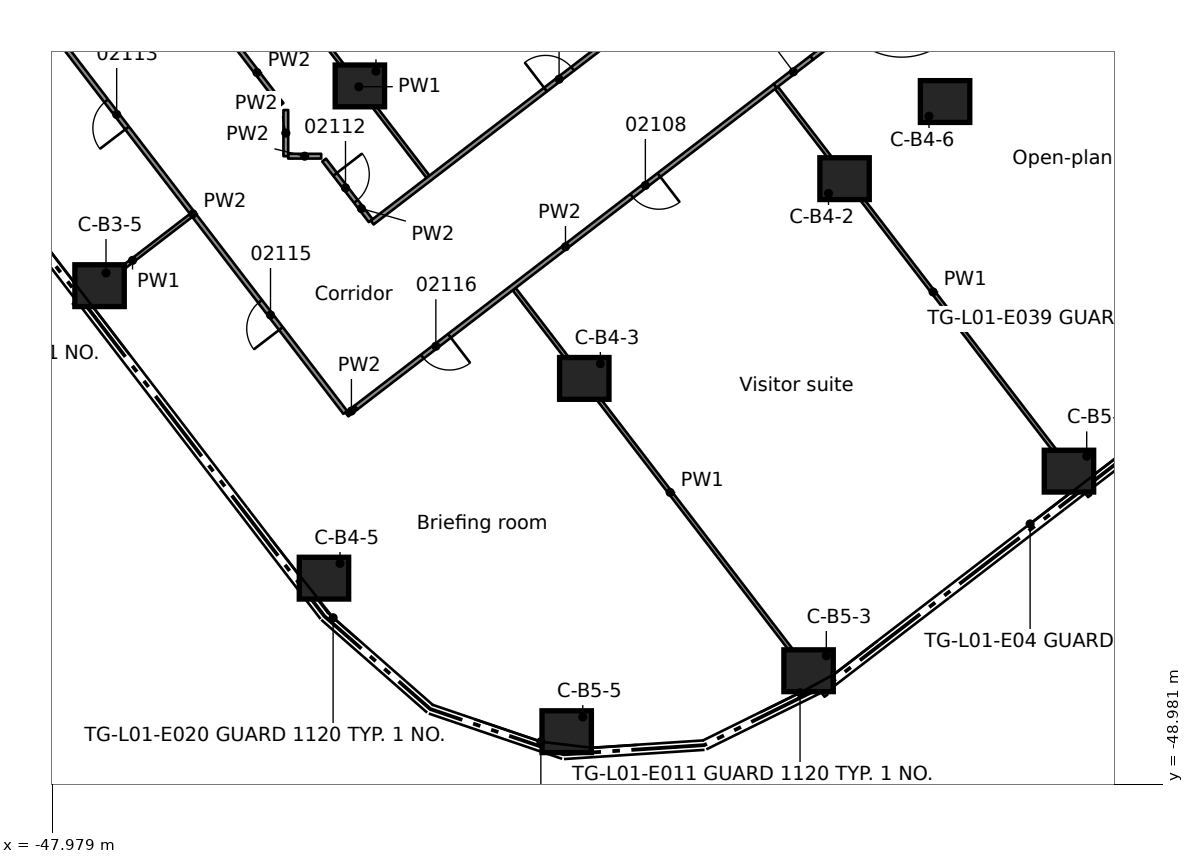
"""IFC4 building model, lengths in metres.
Left out: names, types, materials, properties, quantities, classifications, styles, units other than length and angle.
Written with IfcOpenShell. Run it as: python <this file> out.ifc"""

import sys

from ifc_helpers import new_model, si_unit, direction, frame, frame_2d, origin, origin_2d, place, context, subcontext, project, spatial, rectangle, extrude, element, fill, save


model = new_model("IFC4")
c1 = context("Model", 3, precision=1e-05, world=origin(), true_north=direction((0.0, 1.0)))
c2 = subcontext(c1, "Body", "Model", "MODEL_VIEW")
j1 = project(units=[si_unit("LENGTHUNIT", "METRE"), si_unit("PLANEANGLEUNIT", "RADIAN")], contexts=[c1])
p1 = place(None, origin())
s1 = spatial("IfcSite", under=j1, at=p1, CompositionType="ELEMENT")
p2 = place(p1, origin())
s2 = spatial("IfcBuilding", under=s1, at=p2, CompositionType="ELEMENT")
p3 = place(p2, frame((0.0, 0.0, 10.5)))
s3 = spatial("IfcBuildingStorey", under=s2, at=p3, CompositionType="ELEMENT", Elevation=10.5)
for number, where, z_axis, x_axis in (
    (1, (-39.879, -30.6, -1.0), (0.0, 0.0, 1.0), (0.707, 0.707, 0.0)),
    (2, (-46.729, -35.856, -1.0), (0.0, 0.0, 1.0), (0.707, 0.707, 0.0)),
):
    element("IfcColumn", number, at=place(p3, frame(where, z_axis=z_axis, x_axis=x_axis)), inside=s3, PredefinedType="COLUMN", context=c2, shape_type="SweptSolid", body=[
        extrude(rectangle(XDim=3.4, YDim=3.4, at=origin_2d()), origin(), (0.0, 0.0, 1.0), 1.0),
    ])
p4 = place(p3, frame((-27.125, -33.04, -1.0), z_axis=(0.0, 0.0, 1.0), x_axis=(0.707106781187, 0.707106781187, 0.0)))
e3 = element("IfcColumn", 3, at=p4, inside=s3, PredefinedType="COLUMN", context=c2, shape_type="SweptSolid", body=[
    extrude(rectangle(XDim=3.25, YDim=3.25, at=origin_2d()), origin(), (0.0, 0.0, 1.0), 1.0),
])
for number, where, z_axis, x_axis in (
    (4, (-33.974, -38.296, -1.0), (0.0, 0.0, 1.0), (0.707, 0.707, 0.0)),
    (5, (-40.824, -43.552, -1.0), (0.0, 0.0, 1.0), (0.707, 0.707, 0.0)),
):
    element("IfcColumn", number, at=place(p3, frame(where, z_axis=z_axis, x_axis=x_axis)), inside=s3, PredefinedType="COLUMN", context=c2, shape_type="SweptSolid", body=[
        extrude(rectangle(XDim=3.4, YDim=3.4, at=origin_2d()), origin(), (0.0, 0.0, 1.0), 1.0),
    ])
p5 = place(p3, frame((-24.48, -31.011, -1.0), z_axis=(0.0, 0.0, 1.0), x_axis=(0.707106781187, 0.707106781187, 0.0)))
e6 = element("IfcColumn", 6, at=p5, inside=s3, PredefinedType="COLUMN", context=c2, shape_type="SweptSolid", body=[
    extrude(rectangle(XDim=3.25, YDim=3.25, at=origin_2d()), origin(), (0.0, 0.0, 1.0), 1.0),
])
for number, where, z_axis, x_axis in (
    (7, (-20.99, -28.333, -1.0), (0.0, 0.0, 1.0), (0.707, 0.707, 0.0)),
    (8, (-21.22, -40.736, -1.0), (0.0, 0.0, 1.0), (0.707, 0.707, 0.0)),
    (9, (-28.072, -45.988, -1.0), (0.0, 0.0, 1.0), (0.707, 0.707, 0.0)),
    (10, (-34.437, -47.592, -1.0), (0.0, 0.0, 1.0), (0.707, 0.707, 0.0)),
):
    element("IfcColumn", number, at=place(p3, frame(where, z_axis=z_axis, x_axis=x_axis)), inside=s3, PredefinedType="COLUMN", context=c2, shape_type="SweptSolid", body=[
        extrude(rectangle(XDim=3.4, YDim=3.4, at=origin_2d()), origin(), (0.0, 0.0, 1.0), 1.0),
    ])
p6 = place(p3, frame((-18.57, -35.417, -1.0), z_axis=(0.0, 0.0, 1.0), x_axis=(0.707106781187, 0.707106781187, 0.0)))
e11 = element("IfcColumn", 11, at=p6, inside=s3, PredefinedType="COLUMN", context=c2, shape_type="SweptSolid", body=[
    extrude(rectangle(XDim=2.95, YDim=2.95, at=origin_2d()), origin(), (0.0, 0.0, 1.0), 1.0),
])
for number, where, z_axis, x_axis in (
    (12, (-39.879, -30.6, 0.0), (0.0, 0.0, 1.0), (1.0, 0.0, 0.0)),
    (13, (-46.729, -35.856, 0.0), (0.0, 0.0, 1.0), (1.0, 0.0, 0.0)),
    (14, (-27.125, -33.04, 0.0), (0.0, 0.0, 1.0), (1.0, 0.0, 0.0)),
    (15, (-33.974, -38.296, 0.0), (0.0, 0.0, 1.0), (1.0, 0.0, 0.0)),
    (16, (-40.824, -43.552, 0.0), (0.0, 0.0, 1.0), (1.0, 0.0, 0.0)),
    (17, (-24.48, -31.011, 0.0), (0.0, 0.0, 1.0), (1.0, 0.0, 0.0)),
    (18, (-21.22, -40.736, 0.0), (0.0, 0.0, 1.0), (1.0, 0.0, 0.0)),
    (19, (-28.072, -45.988, 0.0), (0.0, 0.0, 1.0), (1.0, 0.0, 0.0)),
    (20, (-34.437, -47.592, 0.0), (0.0, 0.0, 1.0), (1.0, 0.0, 0.0)),
):
    element("IfcColumn", number, at=place(p3, frame(where, z_axis=z_axis, x_axis=x_axis)), inside=s3, PredefinedType="COLUMN", context=c2, shape_type="SweptSolid", body=[
        extrude(rectangle(XDim=1.3, YDim=1.1, at=origin_2d()), origin(), (0.0, 0.0, 1.0), 5.0),
    ])
p7 = place(p3, frame((-40.264, -39.191, 0.0), z_axis=(0.0, 0.0, 1.0), x_axis=(-0.608717571556, 0.793386991373, 0.0)))
e21 = element("IfcWall", 21, at=p7, inside=s3, PredefinedType="PARTITIONING", context=c2, shape_type="SweptSolid", body=[
    extrude(rectangle(XDim=13.169, YDim=0.125, at=frame_2d((6.584, 0.0))), origin(), (0.0, 0.0, 1.0), 4.58),
])
p8 = place(p7, frame((9.431, 0.0, 0.0)))
e22 = element("IfcOpeningElement", 22, at=p8, cuts=e21, PredefinedType="OPENING", context=c2, shape_type="SweptSolid", body=[
    extrude(rectangle(XDim=0.9, YDim=2.1, at=frame_2d((0.45, 1.05))), frame((0.0, 0.073, 0.0), z_axis=(0.0, -1.0, 0.0), x_axis=(1.0, 0.0, 0.0)), (0.0, 0.0, 1.0), 0.145),
])
p9 = place(p7, frame((2.781, 0.0, 0.0)))
e23 = element("IfcOpeningElement", 23, at=p9, cuts=e21, PredefinedType="OPENING", context=c2, shape_type="SweptSolid", body=[
    extrude(rectangle(XDim=0.9, YDim=2.1, at=frame_2d((0.45, 1.05))), frame((0.0, 0.073, 0.0), z_axis=(0.0, -1.0, 0.0), x_axis=(1.0, 0.0, 0.0)), (0.0, 0.0, 1.0), 0.145),
])
p10 = place(p3, frame((-43.231, -29.408, 0.0), z_axis=(0.0, 0.0, 1.0), x_axis=(0.608774942854, -0.79334297057, 0.0)))
e24 = element("IfcWall", 24, at=p10, inside=s3, PredefinedType="PARTITIONING", context=c2, shape_type="SweptSolid", body=[
    extrude(rectangle(XDim=2.119, YDim=0.125, at=frame_2d((1.06, 0.0))), origin(), (0.0, 0.0, 1.0), 4.58),
])
p11 = place(p3, frame((-40.82, -32.551, 0.0), z_axis=(0.0, 0.0, 1.0), x_axis=(0.609452676656, -0.792822448545, 0.0)))
e25 = element("IfcWall", 25, at=p11, inside=s3, PredefinedType="PARTITIONING", context=c2, shape_type="SweptSolid", body=[
    extrude(rectangle(XDim=2.012, YDim=0.125, at=frame_2d((1.006, 0.0))), origin(), (0.0, 0.0, 1.0), 4.58),
])
p12 = place(p11, frame((0.473, 0.0, 0.0)))
e26 = element("IfcOpeningElement", 26, at=p12, cuts=e25, PredefinedType="OPENING", context=c2, shape_type="SweptSolid", body=[
    extrude(rectangle(XDim=0.9, YDim=2.1, at=frame_2d((0.45, 1.05))), frame((0.0, 0.073, 0.0), z_axis=(0.0, -1.0, 0.0), x_axis=(1.0, 0.0, 0.0)), (0.0, 0.0, 1.0), 0.145),
])
p13 = place(p3, frame((-41.724, -28.252, 0.0), z_axis=(0.0, 0.0, 1.0), x_axis=(0.608928252062, -0.793225304589, 0.0)))
e27 = element("IfcWall", 27, at=p13, inside=s3, PredefinedType="PARTITIONING", context=c2, shape_type="SweptSolid", body=[
    extrude(rectangle(XDim=5.973, YDim=0.1, at=frame_2d((2.987, 0.0))), origin(), (0.0, 0.0, 1.0), 4.58),
])
p14 = place(p3, frame((-35.819, -35.947, 0.0), z_axis=(0.0, 0.0, 1.0), x_axis=(0.608745897366, -0.793365257898, 0.0)))
e28 = element("IfcWall", 28, at=p14, inside=s3, PredefinedType="PARTITIONING", context=c2, shape_type="SweptSolid", body=[
    extrude(rectangle(XDim=13.482, YDim=0.1, at=frame_2d((6.741, 0.0))), origin(), (0.0, 0.0, 1.0), 4.58),
])
p15 = place(p3, frame((-28.917, -30.652, 0.0), z_axis=(0.0, 0.0, 1.0), x_axis=(0.608788953199, -0.793332219478, 0.0)))
e29 = element("IfcWall", 29, at=p15, inside=s3, PredefinedType="PARTITIONING", context=c2, shape_type="SweptSolid", body=[
    extrude(rectangle(XDim=13.535, YDim=0.1, at=frame_2d((6.768, 0.0))), origin(), (0.0, 0.0, 1.0), 4.58),
])
p16 = place(p3, frame((-20.431, -23.791, 0.0), z_axis=(0.0, 0.0, 1.0), x_axis=(0.608708319694, -0.793394089678, 0.0)))
e30 = element("IfcWall", 30, at=p16, inside=s3, PredefinedType="PARTITIONING", context=c2, shape_type="SweptSolid", body=[
    extrude(rectangle(XDim=13.813, YDim=0.1, at=frame_2d((6.906, 0.0))), origin(), (0.0, 0.0, 1.0), 4.58),
])
p17 = place(p3, frame((-41.766, -32.449, 0.0), z_axis=(0.0, 0.0, 1.0), x_axis=(1.0, 0.0, 0.0)))
e31 = element("IfcWall", 31, at=p17, inside=s3, PredefinedType="PARTITIONING", context=c2, shape_type="SweptSolid", body=[
    extrude(rectangle(XDim=0.869, YDim=0.125, at=frame_2d((0.435, 0.0))), origin(), (0.0, 0.0, 1.0), 4.58),
])
p18 = place(p3, frame((-40.221, -39.245, 0.0), z_axis=(0.0, 0.0, 1.0), x_axis=(0.79539441782, 0.606092171291, 0.0)))
e32 = element("IfcWall", 32, at=p18, inside=s3, PredefinedType="PARTITIONING", context=c2, shape_type="SweptSolid", body=[
    extrude(rectangle(XDim=0.301, YDim=0.125, at=frame_2d((0.15, 0.0))), origin(), (0.0, 0.0, 1.0), 4.58),
])
p19 = place(p3, frame((-28.955, -30.6, 0.0), z_axis=(0.0, 0.0, 1.0), x_axis=(0.793590253862, 0.608452552772, 0.0)))
e33 = element("IfcWall", 33, at=p19, inside=s3, PredefinedType="PARTITIONING", context=c2, shape_type="SweptSolid", body=[
    extrude(rectangle(XDim=1.22, YDim=0.125, at=frame_2d((0.61, 0.0))), origin(), (0.0, 0.0, 1.0), 4.58),
])
p20 = place(p3, frame((-28.955, -30.6, 0.0), z_axis=(0.0, 0.0, 1.0), x_axis=(-0.793294727074, -0.608837807627, 0.0)))
e34 = element("IfcWall", 34, at=p20, inside=s3, PredefinedType="PARTITIONING", context=c2, shape_type="SweptSolid", body=[
    extrude(rectangle(XDim=13.9, YDim=0.125, at=frame_2d((6.95, 0.0))), origin(), (0.0, 0.0, 1.0), 4.58),
])
p21 = place(p20, frame((3.851, 0.0, 0.0)))
e35 = element("IfcOpeningElement", 35, at=p21, cuts=e34, PredefinedType="OPENING", context=c2, shape_type="SweptSolid", body=[
    extrude(rectangle(XDim=0.9, YDim=2.1, at=frame_2d((0.45, 1.05))), frame((0.0, 0.073, 0.0), z_axis=(0.0, -1.0, 0.0), x_axis=(1.0, 0.0, 0.0)), (0.0, 0.0, 1.0), 0.145),
])
p22 = place(p20, frame((10.801, 0.0, 0.0)))
e36 = element("IfcOpeningElement", 36, at=p22, cuts=e34, PredefinedType="OPENING", context=c2, shape_type="SweptSolid", body=[
    extrude(rectangle(XDim=0.9, YDim=2.1, at=frame_2d((0.45, 1.05))), frame((0.0, 0.073, 0.0), z_axis=(0.0, -1.0, 0.0), x_axis=(1.0, 0.0, 0.0)), (0.0, 0.0, 1.0), 0.145),
])
p23 = place(p3, frame((-20.567, -24.164, 0.0), z_axis=(0.0, 0.0, 1.0), x_axis=(-0.793345387212, -0.608771793523, 0.0)))
e37 = element("IfcWall", 37, at=p23, inside=s3, PredefinedType="PARTITIONING", context=c2, shape_type="SweptSolid", body=[
    extrude(rectangle(XDim=9.353, YDim=0.125, at=frame_2d((4.677, 0.0))), origin(), (0.0, 0.0, 1.0), 4.58),
])
p24 = place(p23, frame((6.373, 0.0, 0.0)))
e38 = element("IfcOpeningElement", 38, at=p24, cuts=e37, PredefinedType="OPENING", context=c2, shape_type="SweptSolid", body=[
    extrude(rectangle(XDim=1.8, YDim=2.1, at=frame_2d((0.9, 1.05))), frame((0.0, 0.073, 0.0), z_axis=(0.0, -1.0, 0.0), x_axis=(1.0, 0.0, 0.0)), (0.0, 0.0, 1.0), 0.145),
])
p25 = place(p3, frame((-39.556, -34.196, 0.0), z_axis=(0.0, 0.0, 1.0), x_axis=(0.793448872505, 0.608636908773, 0.0)))
e39 = element("IfcWall", 39, at=p25, inside=s3, PredefinedType="PARTITIONING", context=c2, shape_type="SweptSolid", body=[
    extrude(rectangle(XDim=20.788, YDim=0.125, at=frame_2d((10.394, 0.0))), origin(), (0.0, 0.0, 1.0), 4.58),
])
p26 = place(p25, frame((18.0, 0.0, 0.0)))
e40 = element("IfcOpeningElement", 40, at=p26, cuts=e39, PredefinedType="OPENING", context=c2, shape_type="SweptSolid", body=[
    extrude(rectangle(XDim=0.9, YDim=2.1, at=frame_2d((0.45, 1.05))), frame((0.0, 0.073, 0.0), z_axis=(0.0, -1.0, 0.0), x_axis=(1.0, 0.0, 0.0)), (0.0, 0.0, 1.0), 0.145),
])
p27 = place(p25, frame((13.419, 0.0, 0.0)))
e41 = element("IfcOpeningElement", 41, at=p27, cuts=e39, PredefinedType="OPENING", context=c2, shape_type="SweptSolid", body=[
    extrude(rectangle(XDim=0.9, YDim=2.1, at=frame_2d((0.45, 1.05))), frame((0.0, 0.073, 0.0), z_axis=(0.0, -1.0, 0.0), x_axis=(1.0, 0.0, 0.0)), (0.0, 0.0, 1.0), 0.145),
])
p28 = place(p25, frame((5.749, 0.0, 0.0)))
e42 = element("IfcOpeningElement", 42, at=p28, cuts=e39, PredefinedType="OPENING", context=c2, shape_type="SweptSolid", body=[
    extrude(rectangle(XDim=0.9, YDim=2.1, at=frame_2d((0.45, 1.05))), frame((0.0, 0.073, 0.0), z_axis=(0.0, -1.0, 0.0), x_axis=(1.0, 0.0, 0.0)), (0.0, 0.0, 1.0), 0.145),
])
p29 = place(p3, frame((-47.403, -36.374, 0.0), z_axis=(0.0, 0.0, 1.0), x_axis=(0.793195723927, 0.608966783613, 0.0)))
e43 = element("IfcWall", 43, at=p29, inside=s3, PredefinedType="PARTITIONING", context=c2, shape_type="SweptSolid", body=[
    extrude(rectangle(XDim=3.887, YDim=0.1, at=frame_2d((1.943, 0.0))), origin(), (0.0, 0.0, 1.0), 4.58),
])
p30 = place(p3, frame((-41.828, -32.449, 0.0), z_axis=(0.0, 0.0, 1.0), x_axis=(0.0, 1.0, 0.0)))
e44 = element("IfcWall", 44, at=p30, inside=s3, PredefinedType="PARTITIONING", context=c2, shape_type="SweptSolid", body=[
    extrude(rectangle(XDim=1.214, YDim=0.125, at=frame_2d((0.607, 0.0))), origin(), (0.0, 0.0, 1.0), 4.58),
])
p31 = place(p21, origin())
e45 = element("IfcDoor", 45, at=p31, inside=s3, OperationType="SINGLE_SWING_LEFT", PredefinedType="DOOR", context=c2, shape_type="SweptSolid", body=[
    extrude(rectangle(XDim=0.9, YDim=2.1, at=frame_2d((0.45, 1.05))), frame((0.0, 0.025, 0.0), z_axis=(0.0, -1.0, 0.0), x_axis=(1.0, 0.0, 0.0)), (0.0, 0.0, 1.0), 0.05),
])
fill(e35, e45)
p32 = place(p28, origin())
e46 = element("IfcDoor", 46, at=p32, inside=s3, OperationType="SINGLE_SWING_LEFT", PredefinedType="DOOR", context=c2, shape_type="SweptSolid", body=[
    extrude(rectangle(XDim=0.9, YDim=2.1, at=frame_2d((0.45, 1.05))), frame((0.0, 0.025, 0.0), z_axis=(0.0, -1.0, 0.0), x_axis=(1.0, 0.0, 0.0)), (0.0, 0.0, 1.0), 0.05),
])
fill(e42, e46)
p33 = place(p12, origin())
e47 = element("IfcDoor", 47, at=p33, inside=s3, OperationType="SINGLE_SWING_LEFT", PredefinedType="DOOR", context=c2, shape_type="SweptSolid", body=[
    extrude(rectangle(XDim=0.9, YDim=2.1, at=frame_2d((0.45, 1.05))), frame((0.0, 0.025, 0.0), z_axis=(0.0, -1.0, 0.0), x_axis=(1.0, 0.0, 0.0)), (0.0, 0.0, 1.0), 0.05),
])
fill(e26, e47)
p34 = place(p8, origin())
e48 = element("IfcDoor", 48, at=p34, inside=s3, OperationType="SINGLE_SWING_RIGHT", PredefinedType="DOOR", context=c2, shape_type="SweptSolid", body=[
    extrude(rectangle(XDim=0.9, YDim=2.1, at=frame_2d((0.45, 1.05))), frame((0.0, 0.025, 0.0), z_axis=(0.0, -1.0, 0.0), x_axis=(1.0, 0.0, 0.0)), (0.0, 0.0, 1.0), 0.05),
])
fill(e22, e48)
p35 = place(p9, origin())
e49 = element("IfcDoor", 49, at=p35, inside=s3, OperationType="SINGLE_SWING_LEFT", PredefinedType="DOOR", context=c2, shape_type="SweptSolid", body=[
    extrude(rectangle(XDim=0.9, YDim=2.1, at=frame_2d((0.45, 1.05))), frame((0.0, 0.025, 0.0), z_axis=(0.0, -1.0, 0.0), x_axis=(1.0, 0.0, 0.0)), (0.0, 0.0, 1.0), 0.05),
])
fill(e23, e49)
p36 = place(p22, origin())
e50 = element("IfcDoor", 50, at=p36, inside=s3, OperationType="SINGLE_SWING_RIGHT", PredefinedType="DOOR", context=c2, shape_type="SweptSolid", body=[
    extrude(rectangle(XDim=0.9, YDim=2.1, at=frame_2d((0.45, 1.05))), frame((0.0, 0.025, 0.0), z_axis=(0.0, -1.0, 0.0), x_axis=(1.0, 0.0, 0.0)), (0.0, 0.0, 1.0), 0.05),
])
fill(e36, e50)
save(model, sys.argv[1])
